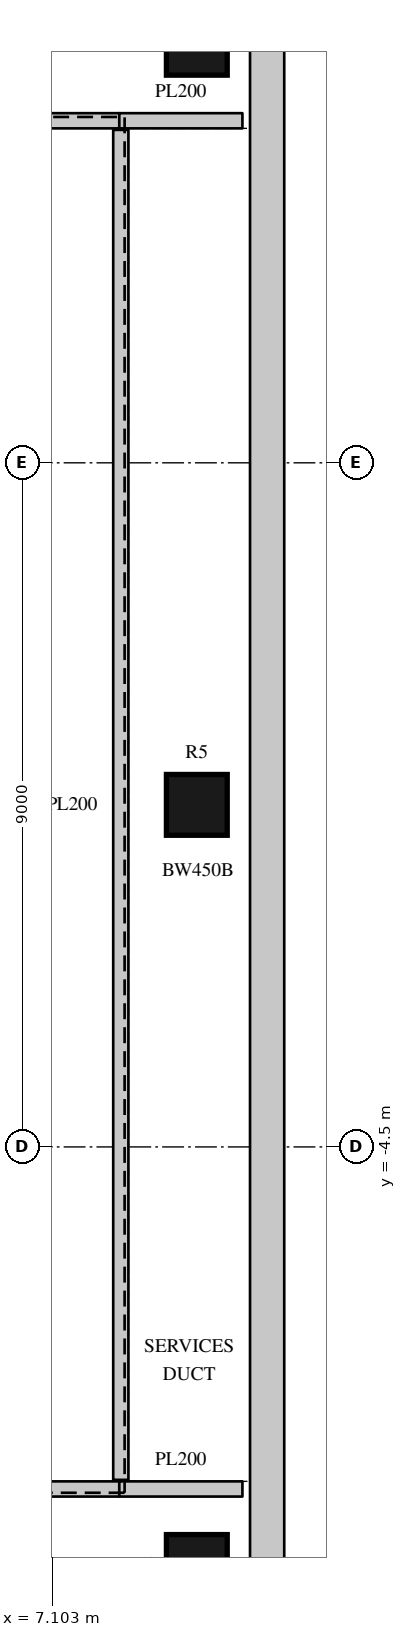
"""IFC4 building model, lengths in metres.
Left out: names, types, materials, properties, quantities, classifications, styles, units other than length and angle.
Written with IfcOpenShell. Run it as: python <this file> out.ifc"""

import sys

from ifc_helpers import new_model, si_unit, direction, frame, frame_2d, origin, origin_2d, place, context, subcontext, project, spatial, rectangle, circle, extrude, element, save


model = new_model("IFC4")
c1 = context("Model", 3, precision=1e-05, world=origin(), true_north=direction((0.0, 1.0)))
c2 = subcontext(c1, "Body", "Model", "MODEL_VIEW")
j1 = project(units=[si_unit("LENGTHUNIT", "METRE"), si_unit("PLANEANGLEUNIT", "RADIAN")], contexts=[c1])
p1 = place(None, origin())
s1 = spatial("IfcSite", under=j1, at=p1, CompositionType="ELEMENT")
p2 = place(p1, origin())
s2 = spatial("IfcBuilding", under=s1, at=p2, CompositionType="ELEMENT")
p3 = place(p2, frame((0.0, 0.0, 343.0)))
s3 = spatial("IfcBuildingStorey", under=s2, at=p3, CompositionType="ELEMENT", Elevation=343.0)
for number, where, z_axis, x_axis in (
    (1, (9.0, -10.0, 0.0), (0.0, 0.0, 1.0), (1.0, 0.0, 0.0)),
    (2, (9.0, 0.0, 0.0), (0.0, 0.0, 1.0), (1.0, 0.0, 0.0)),
    (3, (9.0, 10.0, 0.0), (0.0, 0.0, 1.0), (1.0, 0.0, 0.0)),
):
    element("IfcColumn", number, at=place(p3, frame(where, z_axis=z_axis, x_axis=x_axis)), inside=s3, PredefinedType="COLUMN", context=c2, shape_type="SweptSolid", body=[
        extrude(circle(Radius=0.4, at=origin_2d()), origin(), (0.0, 0.0, 1.0), 4.0),
    ])
p4 = place(p3, frame((9.925, -12.99, 0.0), z_axis=(0.0, 0.0, 1.0), x_axis=(0.0, 1.0, 0.0)))
e4 = element("IfcWall", 4, at=p4, inside=s3, PredefinedType="SOLIDWALL", context=c2, shape_type="SweptSolid", body=[
    extrude(rectangle(XDim=24.229, YDim=0.45, at=frame_2d((12.115, 0.0))), origin(), (0.0, 0.0, 1.0), 3.7),
])
for number, where, z_axis, x_axis in (
    (5, (-5.98, -9.0, 0.0), (0.0, 0.0, 1.0), (1.0, 0.0, 0.0)),
    (6, (-5.98, 9.0, 0.0), (0.0, 0.0, 1.0), (1.0, 0.0, 0.0)),
):
    element("IfcWall", number, at=place(p3, frame(where, z_axis=z_axis, x_axis=x_axis)), inside=s3, PredefinedType="PARTITIONING", context=c2, shape_type="SweptSolid", body=[
        extrude(rectangle(XDim=13.96, YDim=0.2, at=frame_2d((6.98, 0.0))), origin(), (0.0, 0.0, 1.0), 3.598),
    ])
for number, where, z_axis, x_axis in (
    (7, (7.98, -9.0, 0.0), (0.0, 0.0, 1.0), (1.0, 0.0, 0.0)),
    (8, (7.98, 9.0, 0.0), (0.0, 0.0, 1.0), (1.0, 0.0, 0.0)),
):
    element("IfcWall", number, at=place(p3, frame(where, z_axis=z_axis, x_axis=x_axis)), inside=s3, PredefinedType="PARTITIONING", context=c2, shape_type="SweptSolid", body=[
        extrude(rectangle(XDim=1.62, YDim=0.2, at=frame_2d((0.81, 0.0))), origin(), (0.0, 0.0, 1.0), 3.598),
    ])
p5 = place(p3, frame((8.0, -8.88, 0.0), z_axis=(0.0, 0.0, 1.0), x_axis=(0.0, 1.0, 0.0)))
e9 = element("IfcWall", 9, at=p5, inside=s3, PredefinedType="PARTITIONING", context=c2, shape_type="SweptSolid", body=[
    extrude(rectangle(XDim=17.76, YDim=0.2, at=frame_2d((8.88, 0.0))), origin(), (0.0, 0.0, 1.0), 3.598),
])
save(model, sys.argv[1])
